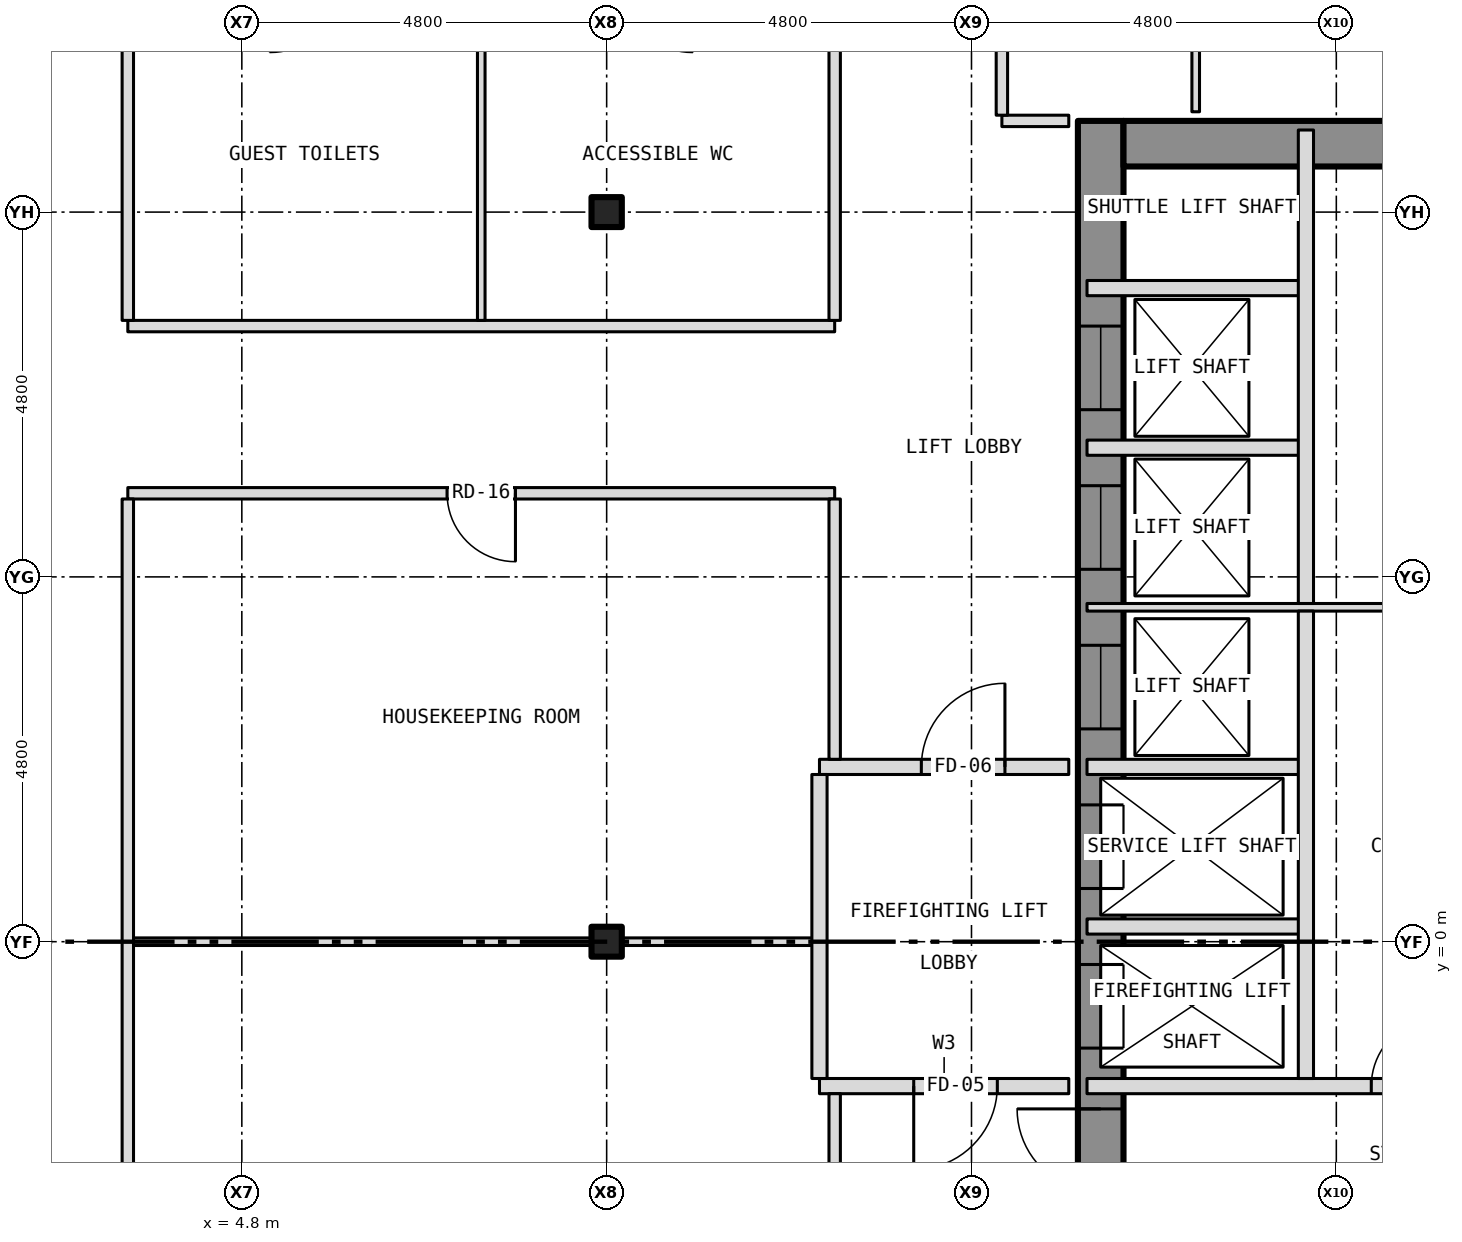
"""IFC4 building model, lengths in metres.
Left out: names, types, materials, properties, quantities, classifications, styles, units other than length and angle.
Written with IfcOpenShell. Run it as: python <this file> out.ifc"""

import sys

from ifc_helpers import new_model, si_unit, direction, frame, frame_2d, origin, origin_2d, place, context, subcontext, project, spatial, rectangle, i_section, extrude, element, fill, save


model = new_model("IFC4")
c1 = context("Model", 3, precision=1e-05, world=origin(), true_north=direction((0.0, 1.0)))
c2 = subcontext(c1, "Body", "Model", "MODEL_VIEW")
j1 = project(units=[si_unit("LENGTHUNIT", "METRE"), si_unit("PLANEANGLEUNIT", "RADIAN")], contexts=[c1])
p1 = place(None, origin())
s1 = spatial("IfcSite", under=j1, at=p1, CompositionType="ELEMENT")
p2 = place(p1, origin())
s2 = spatial("IfcBuilding", under=s1, at=p2, CompositionType="ELEMENT")
p3 = place(p2, frame((0.0, 0.0, 89.0)))
s3 = spatial("IfcBuildingStorey", under=s2, at=p3, CompositionType="ELEMENT", Elevation=89.0)
for number, where, z_axis, x_axis in (
    (1, (9.6, 0.0, -0.15), (0.0, 0.0, 1.0), (1.0, 0.0, 0.0)),
    (2, (9.6, 9.6, -0.15), (0.0, 0.0, 1.0), (1.0, 0.0, 0.0)),
):
    element("IfcColumn", number, at=place(p3, frame(where, z_axis=z_axis, x_axis=x_axis)), inside=s3, PredefinedType="COLUMN", context=c2, shape_type="SweptSolid", body=[
        extrude(i_section(OverallWidth=0.399, OverallDepth=0.394, WebThickness=0.023, FlangeThickness=0.037, at=origin_2d()), origin(), (0.0, 0.0, 1.0), 3.5),
    ])
p4 = place(p3, frame((16.1, -10.8, 0.0), z_axis=(0.0, 0.0, 1.0), x_axis=(0.0, 1.0, 0.0)))
e3 = element("IfcWall", 3, at=p4, inside=s3, PredefinedType="SHEAR", context=c2, shape_type="SweptSolid", body=[
    extrude(rectangle(XDim=21.6, YDim=0.6, at=frame_2d((10.8, 0.0))), origin(), (0.0, 0.0, 1.0), 3.25),
])
p5 = place(p4, frame((9.4, 0.0, 0.0)))
e4 = element("IfcOpeningElement", 4, at=p5, cuts=e3, PredefinedType="OPENING", context=c2, shape_type="SweptSolid", body=[
    extrude(rectangle(XDim=1.1, YDim=2.1, at=frame_2d((0.55, 1.05))), frame((0.0, 0.312, 0.0), z_axis=(0.0, -1.0, 0.0), x_axis=(1.0, 0.0, 0.0)), (0.0, 0.0, 1.0), 0.624),
])
p6 = place(p4, frame((11.5, 0.0, 0.0)))
e5 = element("IfcOpeningElement", 5, at=p6, cuts=e3, PredefinedType="OPENING", context=c2, shape_type="SweptSolid", body=[
    extrude(rectangle(XDim=1.1, YDim=2.1, at=frame_2d((0.55, 1.05))), frame((0.0, 0.312, 0.0), z_axis=(0.0, -1.0, 0.0), x_axis=(1.0, 0.0, 0.0)), (0.0, 0.0, 1.0), 0.624),
])
p7 = place(p4, frame((13.6, 0.0, 0.0)))
e6 = element("IfcOpeningElement", 6, at=p7, cuts=e3, PredefinedType="OPENING", context=c2, shape_type="SweptSolid", body=[
    extrude(rectangle(XDim=1.1, YDim=2.1, at=frame_2d((0.55, 1.05))), frame((0.0, 0.312, 0.0), z_axis=(0.0, -1.0, 0.0), x_axis=(1.0, 0.0, 0.0)), (0.0, 0.0, 1.0), 0.624),
])
p8 = place(p4, frame((15.7, 0.0, 0.0)))
e7 = element("IfcOpeningElement", 7, at=p8, cuts=e3, PredefinedType="OPENING", context=c2, shape_type="SweptSolid", body=[
    extrude(rectangle(XDim=1.1, YDim=2.1, at=frame_2d((0.55, 1.05))), frame((0.0, 0.312, 0.0), z_axis=(0.0, -1.0, 0.0), x_axis=(1.0, 0.0, 0.0)), (0.0, 0.0, 1.0), 0.624),
])
p9 = place(p4, frame((17.8, 0.0, 0.0)))
e8 = element("IfcOpeningElement", 8, at=p9, cuts=e3, PredefinedType="OPENING", context=c2, shape_type="SweptSolid", body=[
    extrude(rectangle(XDim=1.1, YDim=2.1, at=frame_2d((0.55, 1.05))), frame((0.0, 0.312, 0.0), z_axis=(0.0, -1.0, 0.0), x_axis=(1.0, 0.0, 0.0)), (0.0, 0.0, 1.0), 0.624),
])
p10 = place(p4, frame((5.642, 0.0, 0.0)))
e9 = element("IfcOpeningElement", 9, at=p10, cuts=e3, PredefinedType="OPENING", context=c2, shape_type="SweptSolid", body=[
    extrude(rectangle(XDim=1.1, YDim=2.1, at=frame_2d((0.55, 1.05))), frame((0.0, 0.312, 0.0), z_axis=(0.0, -1.0, 0.0), x_axis=(1.0, 0.0, 0.0)), (0.0, 0.0, 1.0), 0.624),
])
p11 = place(p4, frame((7.5, 0.0, 0.0)))
e10 = element("IfcOpeningElement", 10, at=p11, cuts=e3, PredefinedType="OPENING", context=c2, shape_type="SweptSolid", body=[
    extrude(rectangle(XDim=1.1, YDim=2.1, at=frame_2d((0.55, 1.05))), frame((0.0, 0.312, 0.0), z_axis=(0.0, -1.0, 0.0), x_axis=(1.0, 0.0, 0.0)), (0.0, 0.0, 1.0), 0.624),
])
p12 = place(p3, frame((16.4, 10.5, 0.0), z_axis=(0.0, 0.0, 1.0), x_axis=(1.0, 0.0, 0.0)))
e11 = element("IfcWall", 11, at=p12, inside=s3, PredefinedType="SHEAR", context=c2, shape_type="SweptSolid", body=[
    extrude(rectangle(XDim=5.8, YDim=0.6, at=frame_2d((2.9, 0.0))), origin(), (0.0, 0.0, 1.0), 3.25),
])
p13 = place(p3, frame((12.4, -1.9, 0.0), z_axis=(0.0, 0.0, 1.0), x_axis=(1.0, 0.0, 0.0)))
e12 = element("IfcWall", 12, at=p13, inside=s3, PredefinedType="PARTITIONING", context=c2, shape_type="SweptSolid", body=[
    extrude(rectangle(XDim=3.28, YDim=0.2, at=frame_2d((1.64, 0.0))), origin(), (0.0, 0.0, 1.0), 3.35),
])
p14 = place(p13, frame((1.24, 0.0, 0.0)))
e13 = element("IfcOpeningElement", 13, at=p14, cuts=e12, PredefinedType="OPENING", context=c2, shape_type="SweptSolid", body=[
    extrude(rectangle(XDim=1.1, YDim=2.1, at=frame_2d((0.55, 1.05))), frame((0.0, 0.112, 0.0), z_axis=(0.0, -1.0, 0.0), x_axis=(1.0, 0.0, 0.0)), (0.0, 0.0, 1.0), 0.224),
])
p15 = place(p3, frame((15.92, -1.9, 0.0), z_axis=(0.0, 0.0, 1.0), x_axis=(1.0, 0.0, 0.0)))
e14 = element("IfcWall", 14, at=p15, inside=s3, PredefinedType="PARTITIONING", context=c2, shape_type="SweptSolid", body=[
    extrude(rectangle(XDim=6.76, YDim=0.2, at=frame_2d((3.38, 0.0))), origin(), (0.0, 0.0, 1.0), 3.25),
])
p16 = place(p15, frame((3.74, 0.0, 0.0)))
e15 = element("IfcOpeningElement", 15, at=p16, cuts=e14, PredefinedType="OPENING", context=c2, shape_type="SweptSolid", body=[
    extrude(rectangle(XDim=0.9, YDim=2.1, at=frame_2d((0.45, 1.05))), frame((0.0, 0.112, 0.0), z_axis=(0.0, -1.0, 0.0), x_axis=(1.0, 0.0, 0.0)), (0.0, 0.0, 1.0), 0.224),
])
p17 = place(p3, frame((3.3, 0.0, 0.0), z_axis=(0.0, 0.0, 1.0), x_axis=(1.0, 0.0, 0.0)))
e16 = element("IfcWall", 16, at=p17, inside=s3, PredefinedType="PARTITIONING", context=c2, shape_type="SweptSolid", body=[
    extrude(rectangle(XDim=6.101, YDim=0.1, at=frame_2d((3.05, 0.0))), origin(), (0.0, 0.0, 1.0), 2.728),
])
p18 = place(p3, frame((9.401, 0.0, 0.0), z_axis=(0.0, 0.0, 1.0), x_axis=(1.0, 0.0, 0.0)))
e17 = element("IfcWall", 17, at=p18, inside=s3, PredefinedType="PARTITIONING", context=c2, shape_type="SweptSolid", body=[
    extrude(rectangle(XDim=0.398, YDim=0.1, at=frame_2d((0.199, 0.0))), origin(), (0.0, 0.0, 1.0), 3.35),
])
p19 = place(p3, frame((9.799, 0.0, 0.0), z_axis=(0.0, 0.0, 1.0), x_axis=(1.0, 0.0, 0.0)))
e18 = element("IfcWall", 18, at=p19, inside=s3, PredefinedType="PARTITIONING", context=c2, shape_type="SweptSolid", body=[
    extrude(rectangle(XDim=2.601, YDim=0.1, at=frame_2d((1.3, 0.0))), origin(), (0.0, 0.0, 1.0), 2.728),
])
p20 = place(p3, frame((15.92, 0.2, 0.0), z_axis=(0.0, 0.0, 1.0), x_axis=(1.0, 0.0, 0.0)))
e19 = element("IfcWall", 19, at=p20, inside=s3, PredefinedType="PARTITIONING", context=c2, shape_type="SweptSolid", body=[
    extrude(rectangle(XDim=2.88, YDim=0.2, at=frame_2d((1.44, 0.0))), origin(), (0.0, 0.0, 1.0), 3.25),
])
p21 = place(p3, frame((12.4, 2.3, 0.0), z_axis=(0.0, 0.0, 1.0), x_axis=(1.0, 0.0, 0.0)))
e20 = element("IfcWall", 20, at=p21, inside=s3, PredefinedType="PARTITIONING", context=c2, shape_type="SweptSolid", body=[
    extrude(rectangle(XDim=3.28, YDim=0.2, at=frame_2d((1.64, 0.0))), origin(), (0.0, 0.0, 1.0), 3.35),
])
p22 = place(p21, frame((1.34, 0.0, 0.0)))
e21 = element("IfcOpeningElement", 21, at=p22, cuts=e20, PredefinedType="OPENING", context=c2, shape_type="SweptSolid", body=[
    extrude(rectangle(XDim=1.1, YDim=2.1, at=frame_2d((0.55, 1.05))), frame((0.0, 0.112, 0.0), z_axis=(0.0, -1.0, 0.0), x_axis=(1.0, 0.0, 0.0)), (0.0, 0.0, 1.0), 0.224),
])
p23 = place(p3, frame((15.92, 2.3, 0.0), z_axis=(0.0, 0.0, 1.0), x_axis=(1.0, 0.0, 0.0)))
e22 = element("IfcWall", 22, at=p23, inside=s3, PredefinedType="PARTITIONING", context=c2, shape_type="SweptSolid", body=[
    extrude(rectangle(XDim=2.88, YDim=0.2, at=frame_2d((1.44, 0.0))), origin(), (0.0, 0.0, 1.0), 3.25),
])
p24 = place(p3, frame((15.92, 4.4, 0.0), z_axis=(0.0, 0.0, 1.0), x_axis=(1.0, 0.0, 0.0)))
e23 = element("IfcWall", 23, at=p24, inside=s3, PredefinedType="PARTITIONING", context=c2, shape_type="SweptSolid", body=[
    extrude(rectangle(XDim=6.76, YDim=0.1, at=frame_2d((3.38, 0.0))), origin(), (0.0, 0.0, 1.0), 3.25),
])
p25 = place(p24, frame((4.43, 0.0, 0.0)))
e24 = element("IfcOpeningElement", 24, at=p25, cuts=e23, PredefinedType="OPENING", context=c2, shape_type="SweptSolid", body=[
    extrude(rectangle(XDim=0.9, YDim=2.1, at=frame_2d((0.45, 1.05))), frame((0.0, 0.062, 0.0), z_axis=(0.0, -1.0, 0.0), x_axis=(1.0, 0.0, 0.0)), (0.0, 0.0, 1.0), 0.124),
])
p26 = place(p3, frame((3.3, 5.9, 0.0), z_axis=(0.0, 0.0, 1.0), x_axis=(1.0, 0.0, 0.0)))
e25 = element("IfcWall", 25, at=p26, inside=s3, PredefinedType="PARTITIONING", context=c2, shape_type="SweptSolid", body=[
    extrude(rectangle(XDim=9.3, YDim=0.15, at=frame_2d((4.65, 0.0))), origin(), (0.0, 0.0, 1.0), 3.35),
])
p27 = place(p26, frame((4.2, 0.0, 0.0)))
e26 = element("IfcOpeningElement", 26, at=p27, cuts=e25, PredefinedType="OPENING", context=c2, shape_type="SweptSolid", body=[
    extrude(rectangle(XDim=0.9, YDim=2.1, at=frame_2d((0.45, 1.05))), frame((0.0, 0.087, 0.0), z_axis=(0.0, -1.0, 0.0), x_axis=(1.0, 0.0, 0.0)), (0.0, 0.0, 1.0), 0.174),
])
p28 = place(p3, frame((15.92, 6.5, 0.0), z_axis=(0.0, 0.0, 1.0), x_axis=(1.0, 0.0, 0.0)))
e27 = element("IfcWall", 27, at=p28, inside=s3, PredefinedType="PARTITIONING", context=c2, shape_type="SweptSolid", body=[
    extrude(rectangle(XDim=2.88, YDim=0.2, at=frame_2d((1.44, 0.0))), origin(), (0.0, 0.0, 1.0), 3.25),
])
p29 = place(p3, frame((3.3, 8.1, 0.0), z_axis=(0.0, 0.0, 1.0), x_axis=(1.0, 0.0, 0.0)))
e28 = element("IfcWall", 28, at=p29, inside=s3, PredefinedType="PARTITIONING", context=c2, shape_type="SweptSolid", body=[
    extrude(rectangle(XDim=9.3, YDim=0.15, at=frame_2d((4.65, 0.0))), origin(), (0.0, 0.0, 1.0), 3.35),
])
p30 = place(p3, frame((15.92, 8.6, 0.0), z_axis=(0.0, 0.0, 1.0), x_axis=(1.0, 0.0, 0.0)))
e29 = element("IfcWall", 29, at=p30, inside=s3, PredefinedType="PARTITIONING", context=c2, shape_type="SweptSolid", body=[
    extrude(rectangle(XDim=2.88, YDim=0.2, at=frame_2d((1.44, 0.0))), origin(), (0.0, 0.0, 1.0), 3.25),
])
p31 = place(p3, frame((14.8, 10.8, 0.0), z_axis=(0.0, 0.0, 1.0), x_axis=(1.0, 0.0, 0.0)))
e30 = element("IfcWall", 30, at=p31, inside=s3, PredefinedType="PARTITIONING", context=c2, shape_type="SweptSolid", body=[
    extrude(rectangle(XDim=0.88, YDim=0.15, at=frame_2d((0.44, 0.0))), origin(), (0.0, 0.0, 1.0), 3.35),
])
p32 = place(p3, frame((3.3, -12.525, 0.0), z_axis=(0.0, 0.0, 1.0), x_axis=(0.0, 1.0, 0.0)))
e31 = element("IfcWall", 31, at=p32, inside=s3, PredefinedType="PARTITIONING", context=c2, shape_type="SweptSolid", body=[
    extrude(rectangle(XDim=18.35, YDim=0.15, at=frame_2d((9.175, 0.0))), origin(), (0.0, 0.0, 1.0), 3.35),
])
p33 = place(p32, frame((5.775, 0.0, 0.0)))
e32 = element("IfcOpeningElement", 32, at=p33, cuts=e31, PredefinedType="OPENING", context=c2, shape_type="SweptSolid", body=[
    extrude(rectangle(XDim=0.9, YDim=2.1, at=frame_2d((0.45, 1.05))), frame((0.0, 0.087, 0.0), z_axis=(0.0, -1.0, 0.0), x_axis=(1.0, 0.0, 0.0)), (0.0, 0.0, 1.0), 0.174),
])
p34 = place(p3, frame((3.3, 8.175, 0.0), z_axis=(0.0, 0.0, 1.0), x_axis=(0.0, 1.0, 0.0)))
e33 = element("IfcWall", 33, at=p34, inside=s3, PredefinedType="PARTITIONING", context=c2, shape_type="SweptSolid", body=[
    extrude(rectangle(XDim=4.35, YDim=0.15, at=frame_2d((2.175, 0.0))), origin(), (0.0, 0.0, 1.0), 3.35),
])
p35 = place(p3, frame((7.95, 8.175, 0.0), z_axis=(0.0, 0.0, 1.0), x_axis=(0.0, 1.0, 0.0)))
e34 = element("IfcWall", 34, at=p35, inside=s3, PredefinedType="PARTITIONING", context=c2, shape_type="SweptSolid", body=[
    extrude(rectangle(XDim=4.35, YDim=0.1, at=frame_2d((2.175, 0.0))), origin(), (0.0, 0.0, 1.0), 3.35),
])
p36 = place(p3, frame((12.4, -1.8, 0.0), z_axis=(0.0, 0.0, 1.0), x_axis=(0.0, 1.0, 0.0)))
e35 = element("IfcWall", 35, at=p36, inside=s3, PredefinedType="PARTITIONING", context=c2, shape_type="SweptSolid", body=[
    extrude(rectangle(XDim=4.0, YDim=0.2, at=frame_2d((2.0, 0.0))), origin(), (0.0, 0.0, 1.0), 3.35),
])
p37 = place(p3, frame((12.6, -12.525, 0.0), z_axis=(0.0, 0.0, 1.0), x_axis=(0.0, 1.0, 0.0)))
e36 = element("IfcWall", 36, at=p37, inside=s3, PredefinedType="PARTITIONING", context=c2, shape_type="SweptSolid", body=[
    extrude(rectangle(XDim=10.525, YDim=0.15, at=frame_2d((5.262, 0.0))), origin(), (0.0, 0.0, 1.0), 3.35),
])
p38 = place(p3, frame((12.6, 2.4, 0.0), z_axis=(0.0, 0.0, 1.0), x_axis=(0.0, 1.0, 0.0)))
e37 = element("IfcWall", 37, at=p38, inside=s3, PredefinedType="PARTITIONING", context=c2, shape_type="SweptSolid", body=[
    extrude(rectangle(XDim=3.425, YDim=0.15, at=frame_2d((1.712, 0.0))), origin(), (0.0, 0.0, 1.0), 3.35),
])
p39 = place(p3, frame((12.6, 8.175, 0.0), z_axis=(0.0, 0.0, 1.0), x_axis=(0.0, 1.0, 0.0)))
e38 = element("IfcWall", 38, at=p39, inside=s3, PredefinedType="PARTITIONING", context=c2, shape_type="SweptSolid", body=[
    extrude(rectangle(XDim=4.35, YDim=0.15, at=frame_2d((2.175, 0.0))), origin(), (0.0, 0.0, 1.0), 3.35),
])
p40 = place(p3, frame((14.8, 10.875, 0.0), z_axis=(0.0, 0.0, 1.0), x_axis=(0.0, 1.0, 0.0)))
e39 = element("IfcWall", 39, at=p40, inside=s3, PredefinedType="PARTITIONING", context=c2, shape_type="SweptSolid", body=[
    extrude(rectangle(XDim=3.85, YDim=0.15, at=frame_2d((1.925, 0.0))), origin(), (0.0, 0.0, 1.0), 3.35),
])
p41 = place(p40, frame((2.325, 0.0, 0.0)))
e40 = element("IfcOpeningElement", 40, at=p41, cuts=e39, PredefinedType="OPENING", context=c2, shape_type="SweptSolid", body=[
    extrude(rectangle(XDim=1.0, YDim=2.1, at=frame_2d((0.5, 1.05))), frame((0.0, 0.087, 0.0), z_axis=(0.0, -1.0, 0.0), x_axis=(1.0, 0.0, 0.0)), (0.0, 0.0, 1.0), 0.174),
])
p42 = place(p3, frame((17.35, 10.92, 0.0), z_axis=(0.0, 0.0, 1.0), x_axis=(0.0, 1.0, 0.0)))
e41 = element("IfcWall", 41, at=p42, inside=s3, PredefinedType="PARTITIONING", context=c2, shape_type="SweptSolid", body=[
    extrude(rectangle(XDim=12.36, YDim=0.1, at=frame_2d((6.18, 0.0))), origin(), (0.0, 0.0, 1.0), 3.35),
])
p43 = place(p42, frame((5.43, 0.0, 0.0)))
e42 = element("IfcOpeningElement", 42, at=p43, cuts=e41, PredefinedType="OPENING", context=c2, shape_type="SweptSolid", body=[
    extrude(rectangle(XDim=0.9, YDim=2.1, at=frame_2d((0.45, 1.05))), frame((0.0, 0.062, 0.0), z_axis=(0.0, -1.0, 0.0), x_axis=(1.0, 0.0, 0.0)), (0.0, 0.0, 1.0), 0.124),
])
p44 = place(p3, frame((18.8, -1.8, 0.0), z_axis=(0.0, 0.0, 1.0), x_axis=(0.0, 1.0, 0.0)))
e43 = element("IfcWall", 43, at=p44, inside=s3, PredefinedType="PARTITIONING", context=c2, shape_type="SweptSolid", body=[
    extrude(rectangle(XDim=6.15, YDim=0.2, at=frame_2d((3.075, 0.0))), origin(), (0.0, 0.0, 1.0), 3.25),
])
p45 = place(p3, frame((18.8, 4.45, 0.0), z_axis=(0.0, 0.0, 1.0), x_axis=(0.0, 1.0, 0.0)))
e44 = element("IfcWall", 44, at=p45, inside=s3, PredefinedType="PARTITIONING", context=c2, shape_type="SweptSolid", body=[
    extrude(rectangle(XDim=6.23, YDim=0.2, at=frame_2d((3.115, 0.0))), origin(), (0.0, 0.0, 1.0), 3.25),
])
p46 = place(p5, origin())
e45 = element("IfcDoor", 45, at=p46, inside=s3, OperationType="SLIDING_TO_LEFT", PredefinedType="DOOR", context=c2, shape_type="SweptSolid", body=[
    extrude(rectangle(XDim=1.1, YDim=2.1, at=frame_2d((0.55, 1.05))), frame((0.0, 0.025, 0.0), z_axis=(0.0, -1.0, 0.0), x_axis=(1.0, 0.0, 0.0)), (0.0, 0.0, 1.0), 0.05),
])
fill(e4, e45)
p47 = place(p6, origin())
e46 = element("IfcDoor", 46, at=p47, inside=s3, OperationType="SLIDING_TO_LEFT", PredefinedType="DOOR", context=c2, shape_type="SweptSolid", body=[
    extrude(rectangle(XDim=1.1, YDim=2.1, at=frame_2d((0.55, 1.05))), frame((0.0, 0.025, 0.0), z_axis=(0.0, -1.0, 0.0), x_axis=(1.0, 0.0, 0.0)), (0.0, 0.0, 1.0), 0.05),
])
fill(e5, e46)
p48 = place(p7, origin())
e47 = element("IfcDoor", 47, at=p48, inside=s3, OperationType="SLIDING_TO_LEFT", PredefinedType="DOOR", context=c2, shape_type="SweptSolid", body=[
    extrude(rectangle(XDim=1.1, YDim=2.1, at=frame_2d((0.55, 1.05))), frame((0.0, 0.025, 0.0), z_axis=(0.0, -1.0, 0.0), x_axis=(1.0, 0.0, 0.0)), (0.0, 0.0, 1.0), 0.05),
])
fill(e6, e47)
p49 = place(p8, origin())
e48 = element("IfcDoor", 48, at=p49, inside=s3, OperationType="SLIDING_TO_LEFT", PredefinedType="DOOR", context=c2, shape_type="SweptSolid", body=[
    extrude(rectangle(XDim=1.1, YDim=2.1, at=frame_2d((0.55, 1.05))), frame((0.0, 0.025, 0.0), z_axis=(0.0, -1.0, 0.0), x_axis=(1.0, 0.0, 0.0)), (0.0, 0.0, 1.0), 0.05),
])
fill(e7, e48)
p50 = place(p9, origin())
e49 = element("IfcDoor", 49, at=p50, inside=s3, OperationType="SLIDING_TO_LEFT", PredefinedType="DOOR", context=c2, shape_type="SweptSolid", body=[
    extrude(rectangle(XDim=1.1, YDim=2.1, at=frame_2d((0.55, 1.05))), frame((0.0, 0.025, 0.0), z_axis=(0.0, -1.0, 0.0), x_axis=(1.0, 0.0, 0.0)), (0.0, 0.0, 1.0), 0.05),
])
fill(e8, e49)
p51 = place(p11, origin())
e50 = element("IfcDoor", 50, at=p51, inside=s3, OperationType="SINGLE_SWING_RIGHT", PredefinedType="DOOR", context=c2, shape_type="SweptSolid", body=[
    extrude(rectangle(XDim=1.1, YDim=2.1, at=frame_2d((0.55, 1.05))), frame((0.0, 0.025, 0.0), z_axis=(0.0, -1.0, 0.0), x_axis=(1.0, 0.0, 0.0)), (0.0, 0.0, 1.0), 0.05),
])
fill(e10, e50)
p52 = place(p16, origin())
e51 = element("IfcDoor", 51, at=p52, inside=s3, OperationType="SINGLE_SWING_RIGHT", PredefinedType="DOOR", context=c2, shape_type="SweptSolid", body=[
    extrude(rectangle(XDim=0.9, YDim=2.1, at=frame_2d((0.45, 1.05))), frame((0.0, 0.025, 0.0), z_axis=(0.0, -1.0, 0.0), x_axis=(1.0, 0.0, 0.0)), (0.0, 0.0, 1.0), 0.05),
])
fill(e15, e51)
p53 = place(p14, origin())
e52 = element("IfcDoor", 52, at=p53, inside=s3, OperationType="SINGLE_SWING_LEFT", PredefinedType="DOOR", context=c2, shape_type="SweptSolid", body=[
    extrude(rectangle(XDim=1.1, YDim=2.1, at=frame_2d((0.55, 1.05))), frame((0.0, 0.025, 0.0), z_axis=(0.0, -1.0, 0.0), x_axis=(1.0, 0.0, 0.0)), (0.0, 0.0, 1.0), 0.05),
])
fill(e13, e52)
p54 = place(p22, origin())
e53 = element("IfcDoor", 53, at=p54, inside=s3, OperationType="SINGLE_SWING_RIGHT", PredefinedType="DOOR", context=c2, shape_type="SweptSolid", body=[
    extrude(rectangle(XDim=1.1, YDim=2.1, at=frame_2d((0.55, 1.05))), frame((0.0, 0.025, 0.0), z_axis=(0.0, -1.0, 0.0), x_axis=(1.0, 0.0, 0.0)), (0.0, 0.0, 1.0), 0.05),
])
fill(e21, e53)
p55 = place(p27, origin())
e54 = element("IfcDoor", 54, at=p55, inside=s3, OperationType="SINGLE_SWING_RIGHT", PredefinedType="DOOR", context=c2, shape_type="SweptSolid", body=[
    extrude(rectangle(XDim=0.9, YDim=2.1, at=frame_2d((0.45, 1.05))), frame((0.0, 0.025, 0.0), z_axis=(0.0, -1.0, 0.0), x_axis=(1.0, 0.0, 0.0)), (0.0, 0.0, 1.0), 0.05),
])
fill(e26, e54)
save(model, sys.argv[1])
